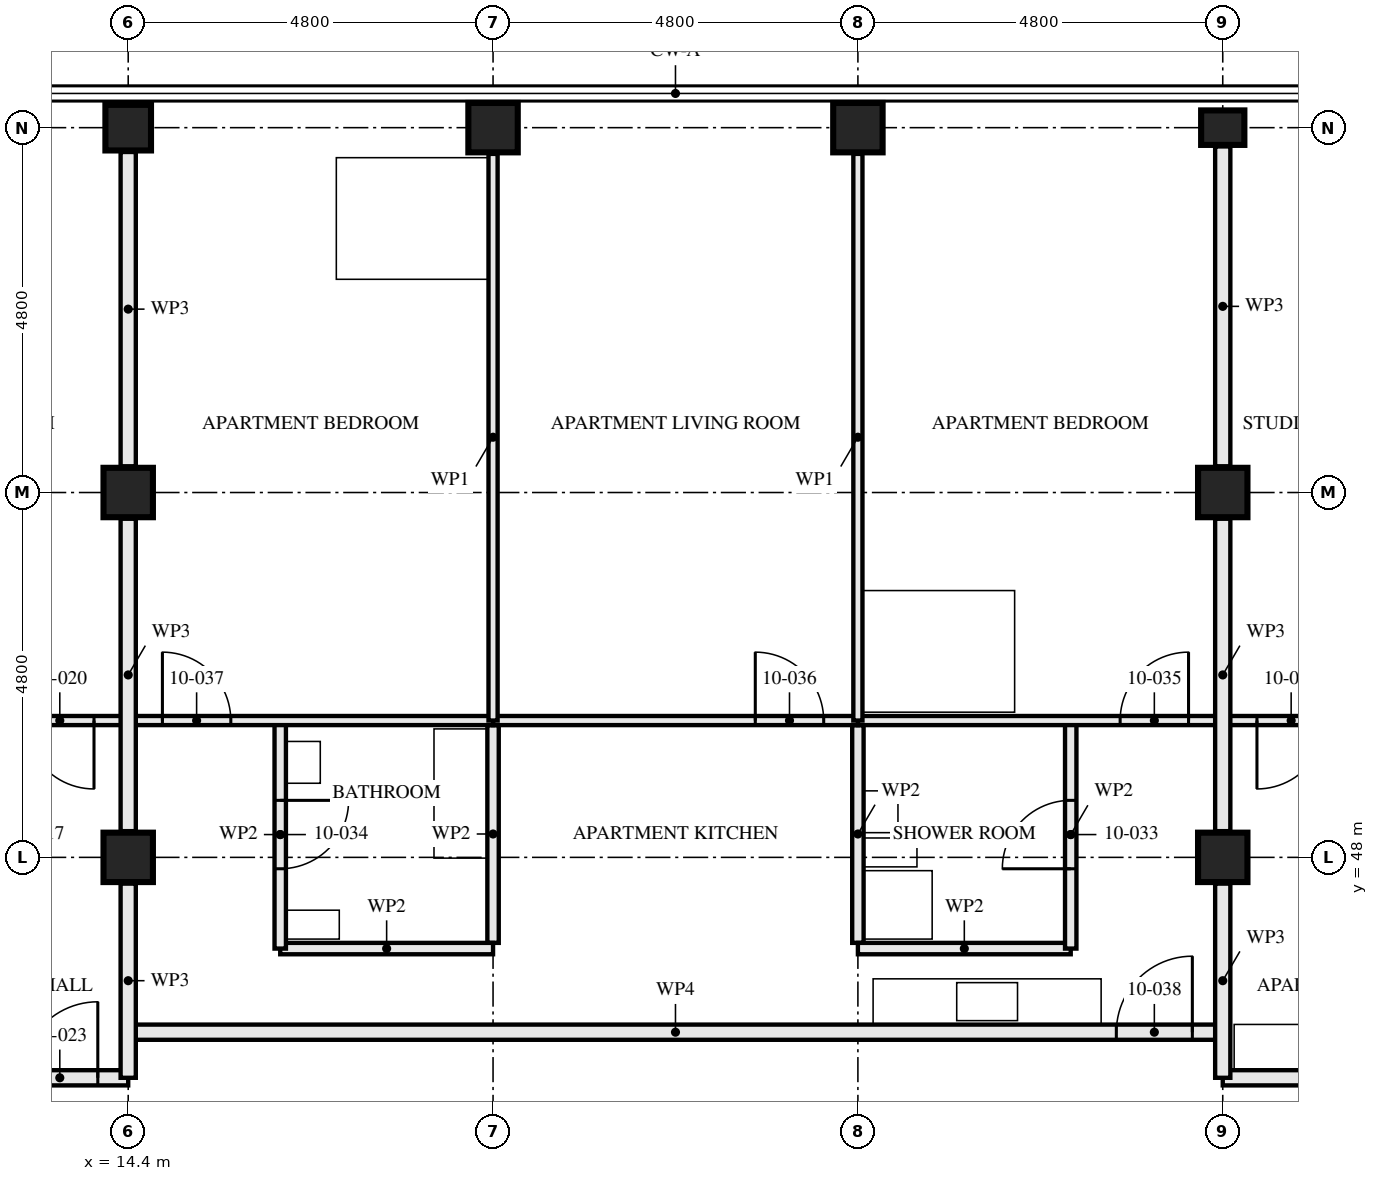
"""IFC4 building model, lengths in metres.
Left out: names, types, materials, properties, quantities, classifications, styles, units other than length and angle.
Written with IfcOpenShell. Run it as: python <this file> out.ifc"""

import sys

from ifc_helpers import new_model, si_unit, direction, frame, frame_2d, origin, origin_2d, place, context, subcontext, project, spatial, rectangle, hollow_rectangle, i_section, extrude, element, fill, save


model = new_model("IFC4")
c1 = context("Model", 3, precision=1e-05, world=origin(), true_north=direction((0.0, 1.0)))
c2 = subcontext(c1, "Body", "Model", "MODEL_VIEW")
j1 = project(units=[si_unit("LENGTHUNIT", "METRE"), si_unit("PLANEANGLEUNIT", "RADIAN")], contexts=[c1])
p1 = place(None, origin())
s1 = spatial("IfcSite", under=j1, at=p1, CompositionType="ELEMENT")
p2 = place(p1, origin())
s2 = spatial("IfcBuilding", under=s1, at=p2, CompositionType="ELEMENT")
p3 = place(p2, frame((0.0, 0.0, 41.0)))
s3 = spatial("IfcBuildingStorey", under=s2, at=p3, CompositionType="ELEMENT", Elevation=41.0)
for number, where, z_axis, x_axis in (
    (1, (14.4, 48.0, 0.0), (0.0, 0.0, 1.0), (1.0, 0.0, 0.0)),
    (2, (14.4, 52.8, 0.0), (0.0, 0.0, 1.0), (1.0, 0.0, 0.0)),
):
    element("IfcColumn", number, at=place(p3, frame(where, z_axis=z_axis, x_axis=x_axis)), inside=s3, PredefinedType="COLUMN", context=c2, shape_type="SweptSolid", body=[
        extrude(hollow_rectangle(XDim=0.65, YDim=0.65, WallThickness=0.05, at=origin_2d()), origin(), (0.0, 0.0, 1.0), 3.5),
    ])
p4 = place(p3, frame((14.4, 57.6, 0.0), z_axis=(0.0, 0.0, 1.0), x_axis=(0.0, 1.0, 0.0)))
e3 = element("IfcColumn", 3, at=p4, inside=s3, PredefinedType="COLUMN", context=c2, shape_type="SweptSolid", body=[
    extrude(hollow_rectangle(XDim=0.6, YDim=0.6, WallThickness=0.08, at=origin_2d()), origin(), (0.0, 0.0, 1.0), 3.5),
])
for number, where, z_axis, x_axis in (
    (4, (19.2, 57.6, 0.0), (0.0, 0.0, 1.0), (0.0, 1.0, 0.0)),
    (5, (24.0, 57.6, 0.0), (0.0, 0.0, 1.0), (0.0, 1.0, 0.0)),
):
    element("IfcColumn", number, at=place(p3, frame(where, z_axis=z_axis, x_axis=x_axis)), inside=s3, PredefinedType="COLUMN", context=c2, shape_type="SweptSolid", body=[
        extrude(hollow_rectangle(XDim=0.65, YDim=0.65, WallThickness=0.08, at=origin_2d()), origin(), (0.0, 0.0, 1.0), 3.5),
    ])
for number, where, z_axis, x_axis in (
    (6, (28.8, 48.0, 0.0), (0.0, 0.0, 1.0), (1.0, 0.0, 0.0)),
    (7, (28.8, 52.8, 0.0), (0.0, 0.0, 1.0), (1.0, 0.0, 0.0)),
):
    element("IfcColumn", number, at=place(p3, frame(where, z_axis=z_axis, x_axis=x_axis)), inside=s3, PredefinedType="COLUMN", context=c2, shape_type="SweptSolid", body=[
        extrude(hollow_rectangle(XDim=0.65, YDim=0.65, WallThickness=0.05, at=origin_2d()), origin(), (0.0, 0.0, 1.0), 3.5),
    ])
p5 = place(p3, frame((28.8, 57.6, 0.0), z_axis=(0.0, 0.0, 1.0), x_axis=(0.0, 1.0, 0.0)))
e8 = element("IfcColumn", 8, at=p5, inside=s3, PredefinedType="COLUMN", context=c2, shape_type="SweptSolid", body=[
    extrude(i_section(OverallWidth=0.454, OverallDepth=0.569, WebThickness=0.078, FlangeThickness=0.125, FilletRadius=0.015, at=origin_2d()), origin(), (0.0, 0.0, 1.0), 3.5),
])
p6 = place(p3, frame((14.4, 49.8, 0.0), z_axis=(0.0, 0.0, 1.0), x_axis=(-1.0, 0.0, 0.0)))
e9 = element("IfcWall", 9, at=p6, inside=s3, PredefinedType="PARTITIONING", context=c2, shape_type="SweptSolid", body=[
    extrude(rectangle(XDim=4.8, YDim=0.12, at=frame_2d((2.4, 0.0))), origin(), (0.0, 0.0, 1.0), 3.33),
])
p7 = place(p6, frame((0.45, 0.0, 0.0)))
e10 = element("IfcOpeningElement", 10, at=p7, cuts=e9, PredefinedType="OPENING", context=c2, shape_type="SweptSolid", body=[
    extrude(rectangle(XDim=0.9, YDim=2.1, at=frame_2d((0.45, 1.05))), frame((0.0, 0.071, 0.0), z_axis=(0.0, -1.0, 0.0), x_axis=(1.0, 0.0, 0.0)), (0.0, 0.0, 1.0), 0.141),
])
p8 = place(p3, frame((14.4, 45.1, 0.0), z_axis=(0.0, 0.0, 1.0), x_axis=(-1.0, 0.0, 0.0)))
e11 = element("IfcWall", 11, at=p8, inside=s3, PredefinedType="PARTITIONING", context=c2, shape_type="SweptSolid", body=[
    extrude(rectangle(XDim=9.6, YDim=0.2, at=frame_2d((4.8, 0.0))), origin(), (0.0, 0.0, 1.0), 3.33),
])
p9 = place(p8, frame((0.4, 0.0, 0.0)))
e12 = element("IfcOpeningElement", 12, at=p9, cuts=e11, PredefinedType="OPENING", context=c2, shape_type="SweptSolid", body=[
    extrude(rectangle(XDim=1.0, YDim=2.1, at=frame_2d((0.5, 1.05))), frame((0.0, 0.111, 0.0), z_axis=(0.0, -1.0, 0.0), x_axis=(1.0, 0.0, 0.0)), (0.0, 0.0, 1.0), 0.221),
])
p10 = place(p3, frame((26.8, 49.8, 0.0), z_axis=(0.0, 0.0, 1.0), x_axis=(0.0, -1.0, 0.0)))
e13 = element("IfcWall", 13, at=p10, inside=s3, PredefinedType="PARTITIONING", context=c2, shape_type="SweptSolid", body=[
    extrude(rectangle(XDim=3.0, YDim=0.15, at=frame_2d((1.5, 0.0))), origin(), (0.0, 0.0, 1.0), 2.55),
])
p11 = place(p10, frame((1.05, 0.0, 0.0)))
e14 = element("IfcOpeningElement", 14, at=p11, cuts=e13, PredefinedType="OPENING", context=c2, shape_type="SweptSolid", body=[
    extrude(rectangle(XDim=0.9, YDim=2.1, at=frame_2d((0.45, 1.05))), frame((0.0, 0.085, 0.0), z_axis=(0.0, -1.0, 0.0), x_axis=(1.0, 0.0, 0.0)), (0.0, 0.0, 1.0), 0.171),
])
p12 = place(p3, frame((26.8, 46.8, 0.0), z_axis=(0.0, 0.0, 1.0), x_axis=(-1.0, 0.0, 0.0)))
e15 = element("IfcWall", 15, at=p12, inside=s3, PredefinedType="PARTITIONING", context=c2, shape_type="SweptSolid", body=[
    extrude(rectangle(XDim=2.8, YDim=0.15, at=frame_2d((1.4, 0.0))), origin(), (0.0, 0.0, 1.0), 3.33),
])
p13 = place(p3, frame((16.4, 49.8, 0.0), z_axis=(0.0, 0.0, 1.0), x_axis=(0.0, -1.0, 0.0)))
e16 = element("IfcWall", 16, at=p13, inside=s3, PredefinedType="PARTITIONING", context=c2, shape_type="SweptSolid", body=[
    extrude(rectangle(XDim=3.0, YDim=0.15, at=frame_2d((1.5, 0.0))), origin(), (0.0, 0.0, 1.0), 2.55),
])
p14 = place(p13, frame((1.05, 0.0, 0.0)))
e17 = element("IfcOpeningElement", 17, at=p14, cuts=e16, PredefinedType="OPENING", context=c2, shape_type="SweptSolid", body=[
    extrude(rectangle(XDim=0.9, YDim=2.1, at=frame_2d((0.45, 1.05))), frame((0.0, 0.085, 0.0), z_axis=(0.0, -1.0, 0.0), x_axis=(1.0, 0.0, 0.0)), (0.0, 0.0, 1.0), 0.171),
])
p15 = place(p3, frame((19.2, 46.8, 0.0), z_axis=(0.0, 0.0, 1.0), x_axis=(-1.0, 0.0, 0.0)))
e18 = element("IfcWall", 18, at=p15, inside=s3, PredefinedType="PARTITIONING", context=c2, shape_type="SweptSolid", body=[
    extrude(rectangle(XDim=2.8, YDim=0.15, at=frame_2d((1.4, 0.0))), origin(), (0.0, 0.0, 1.0), 3.33),
])
p16 = place(p3, frame((28.8, 49.8, 0.0), z_axis=(0.0, 0.0, 1.0), x_axis=(-1.0, 0.0, 0.0)))
e19 = element("IfcWall", 19, at=p16, inside=s3, PredefinedType="PARTITIONING", context=c2, shape_type="SweptSolid", body=[
    extrude(rectangle(XDim=4.8, YDim=0.12, at=frame_2d((2.4, 0.0))), origin(), (0.0, 0.0, 1.0), 3.33),
])
p17 = place(p16, frame((0.45, 0.0, 0.0)))
e20 = element("IfcOpeningElement", 20, at=p17, cuts=e19, PredefinedType="OPENING", context=c2, shape_type="SweptSolid", body=[
    extrude(rectangle(XDim=0.9, YDim=2.1, at=frame_2d((0.45, 1.05))), frame((0.0, 0.071, 0.0), z_axis=(0.0, -1.0, 0.0), x_axis=(1.0, 0.0, 0.0)), (0.0, 0.0, 1.0), 0.141),
])
p18 = place(p3, frame((24.0, 49.8, 0.0), z_axis=(0.0, 0.0, 1.0), x_axis=(-1.0, 0.0, 0.0)))
e21 = element("IfcWall", 21, at=p18, inside=s3, PredefinedType="PARTITIONING", context=c2, shape_type="SweptSolid", body=[
    extrude(rectangle(XDim=4.8, YDim=0.12, at=frame_2d((2.4, 0.0))), origin(), (0.0, 0.0, 1.0), 3.33),
])
p19 = place(p18, frame((0.45, 0.0, 0.0)))
e22 = element("IfcOpeningElement", 22, at=p19, cuts=e21, PredefinedType="OPENING", context=c2, shape_type="SweptSolid", body=[
    extrude(rectangle(XDim=0.9, YDim=2.1, at=frame_2d((0.45, 1.05))), frame((0.0, 0.071, 0.0), z_axis=(0.0, -1.0, 0.0), x_axis=(1.0, 0.0, 0.0)), (0.0, 0.0, 1.0), 0.141),
])
p20 = place(p3, frame((19.2, 49.8, 0.0), z_axis=(0.0, 0.0, 1.0), x_axis=(-1.0, 0.0, 0.0)))
e23 = element("IfcWall", 23, at=p20, inside=s3, PredefinedType="PARTITIONING", context=c2, shape_type="SweptSolid", body=[
    extrude(rectangle(XDim=4.8, YDim=0.12, at=frame_2d((2.4, 0.0))), origin(), (0.0, 0.0, 1.0), 3.33),
])
p21 = place(p20, frame((3.45, 0.0, 0.0)))
e24 = element("IfcOpeningElement", 24, at=p21, cuts=e23, PredefinedType="OPENING", context=c2, shape_type="SweptSolid", body=[
    extrude(rectangle(XDim=0.9, YDim=2.1, at=frame_2d((0.45, 1.05))), frame((0.0, 0.071, 0.0), z_axis=(0.0, -1.0, 0.0), x_axis=(1.0, 0.0, 0.0)), (0.0, 0.0, 1.0), 0.141),
])
for number, where, z_axis, x_axis in (
    (25, (24.0, 57.255, 0.0), (0.0, 0.0, 1.0), (0.0, -1.0, 0.0)),
    (26, (19.2, 57.255, 0.0), (0.0, 0.0, 1.0), (0.0, -1.0, 0.0)),
):
    element("IfcWall", number, at=place(p3, frame(where, z_axis=z_axis, x_axis=x_axis)), inside=s3, PredefinedType="PARTITIONING", context=c2, shape_type="SweptSolid", body=[
        extrude(rectangle(XDim=7.455, YDim=0.12, at=frame_2d((3.728, 0.0))), origin(), (0.0, 0.0, 1.0), 2.55),
    ])
p22 = place(p3, frame((28.8, 45.7, 0.0), z_axis=(0.0, 0.0, 1.0), x_axis=(-1.0, 0.0, 0.0)))
e27 = element("IfcWall", 27, at=p22, inside=s3, PredefinedType="PARTITIONING", context=c2, shape_type="SweptSolid", body=[
    extrude(rectangle(XDim=14.4, YDim=0.2, at=frame_2d((7.2, 0.0))), origin(), (0.0, 0.0, 1.0), 3.33),
])
p23 = place(p22, frame((0.4, 0.0, 0.0)))
e28 = element("IfcOpeningElement", 28, at=p23, cuts=e27, PredefinedType="OPENING", context=c2, shape_type="SweptSolid", body=[
    extrude(rectangle(XDim=1.0, YDim=2.1, at=frame_2d((0.5, 1.05))), frame((0.0, 0.111, 0.0), z_axis=(0.0, -1.0, 0.0), x_axis=(1.0, 0.0, 0.0)), (0.0, 0.0, 1.0), 0.221),
])
p24 = place(p3, frame((33.6, 49.8, 0.0), z_axis=(0.0, 0.0, 1.0), x_axis=(-1.0, 0.0, 0.0)))
e29 = element("IfcWall", 29, at=p24, inside=s3, PredefinedType="PARTITIONING", context=c2, shape_type="SweptSolid", body=[
    extrude(rectangle(XDim=4.8, YDim=0.12, at=frame_2d((2.4, 0.0))), origin(), (0.0, 0.0, 1.0), 3.33),
])
p25 = place(p24, frame((3.45, 0.0, 0.0)))
e30 = element("IfcOpeningElement", 30, at=p25, cuts=e29, PredefinedType="OPENING", context=c2, shape_type="SweptSolid", body=[
    extrude(rectangle(XDim=0.9, YDim=2.1, at=frame_2d((0.45, 1.05))), frame((0.0, 0.071, 0.0), z_axis=(0.0, -1.0, 0.0), x_axis=(1.0, 0.0, 0.0)), (0.0, 0.0, 1.0), 0.141),
])
p26 = place(p3, frame((38.4, 45.1, 0.0), z_axis=(0.0, 0.0, 1.0), x_axis=(-1.0, 0.0, 0.0)))
e31 = element("IfcWall", 31, at=p26, inside=s3, PredefinedType="PARTITIONING", context=c2, shape_type="SweptSolid", body=[
    extrude(rectangle(XDim=9.6, YDim=0.2, at=frame_2d((4.8, 0.0))), origin(), (0.0, 0.0, 1.0), 3.33),
])
p27 = place(p26, frame((0.4, 0.0, 0.0)))
e32 = element("IfcOpeningElement", 32, at=p27, cuts=e31, PredefinedType="OPENING", context=c2, shape_type="SweptSolid", body=[
    extrude(rectangle(XDim=1.0, YDim=2.1, at=frame_2d((0.5, 1.05))), frame((0.0, 0.111, 0.0), z_axis=(0.0, -1.0, 0.0), x_axis=(1.0, 0.0, 0.0)), (0.0, 0.0, 1.0), 0.221),
])
p28 = place(p26, frame((5.2, 0.0, 0.0)))
e33 = element("IfcOpeningElement", 33, at=p28, cuts=e31, PredefinedType="OPENING", context=c2, shape_type="SweptSolid", body=[
    extrude(rectangle(XDim=1.0, YDim=2.1, at=frame_2d((0.5, 1.05))), frame((0.0, 0.111, 0.0), z_axis=(0.0, -1.0, 0.0), x_axis=(1.0, 0.0, 0.0)), (0.0, 0.0, 1.0), 0.221),
])
p29 = place(p3, frame((14.4, 45.1, 0.0), z_axis=(0.0, 0.0, 1.0), x_axis=(0.0, 1.0, 0.0)))
e34 = element("IfcWall", 34, at=p29, inside=s3, PredefinedType="PARTITIONING", context=c2, shape_type="SweptSolid", body=[
    extrude(rectangle(XDim=2.555, YDim=0.2, at=frame_2d((1.277, 0.0))), origin(), (0.0, 0.0, 1.0), 2.32),
])
p30 = place(p3, frame((14.4, 48.345, 0.0), z_axis=(0.0, 0.0, 1.0), x_axis=(0.0, 1.0, 0.0)))
e35 = element("IfcWall", 35, at=p30, inside=s3, PredefinedType="PARTITIONING", context=c2, shape_type="SweptSolid", body=[
    extrude(rectangle(XDim=4.11, YDim=0.2, at=frame_2d((2.055, 0.0))), origin(), (0.0, 0.0, 1.0), 2.32),
])
p31 = place(p3, frame((14.4, 53.145, 0.0), z_axis=(0.0, 0.0, 1.0), x_axis=(0.0, 1.0, 0.0)))
e36 = element("IfcWall", 36, at=p31, inside=s3, PredefinedType="PARTITIONING", context=c2, shape_type="SweptSolid", body=[
    extrude(rectangle(XDim=4.135, YDim=0.2, at=frame_2d((2.067, 0.0))), origin(), (0.0, 0.0, 1.0), 2.32),
])
p32 = place(p3, frame((28.8, 45.1, 0.0), z_axis=(0.0, 0.0, 1.0), x_axis=(0.0, 1.0, 0.0)))
e37 = element("IfcWall", 37, at=p32, inside=s3, PredefinedType="PARTITIONING", context=c2, shape_type="SweptSolid", body=[
    extrude(rectangle(XDim=2.555, YDim=0.2, at=frame_2d((1.277, 0.0))), origin(), (0.0, 0.0, 1.0), 2.32),
])
p33 = place(p3, frame((28.8, 48.345, 0.0), z_axis=(0.0, 0.0, 1.0), x_axis=(0.0, 1.0, 0.0)))
e38 = element("IfcWall", 38, at=p33, inside=s3, PredefinedType="PARTITIONING", context=c2, shape_type="SweptSolid", body=[
    extrude(rectangle(XDim=4.11, YDim=0.2, at=frame_2d((2.055, 0.0))), origin(), (0.0, 0.0, 1.0), 2.32),
])
p34 = place(p3, frame((28.8, 53.145, 0.0), z_axis=(0.0, 0.0, 1.0), x_axis=(0.0, 1.0, 0.0)))
e39 = element("IfcWall", 39, at=p34, inside=s3, PredefinedType="PARTITIONING", context=c2, shape_type="SweptSolid", body=[
    extrude(rectangle(XDim=4.208, YDim=0.2, at=frame_2d((2.104, 0.0))), origin(), (0.0, 0.0, 1.0), 2.32),
])
for number, where, z_axis, x_axis in (
    (40, (24.0, 46.875, 0.0), (0.0, 0.0, 1.0), (0.0, 1.0, 0.0)),
    (41, (19.2, 49.74, 0.0), (0.0, 0.0, 1.0), (0.0, -1.0, 0.0)),
):
    element("IfcWall", number, at=place(p3, frame(where, z_axis=z_axis, x_axis=x_axis)), inside=s3, PredefinedType="PARTITIONING", context=c2, shape_type="SweptSolid", body=[
        extrude(rectangle(XDim=2.865, YDim=0.15, at=frame_2d((1.433, 0.0))), origin(), (0.0, 0.0, 1.0), 2.55),
    ])
p35 = place(p7, origin())
e42 = element("IfcDoor", 42, at=p35, inside=s3, OperationType="SINGLE_SWING_RIGHT", PredefinedType="DOOR", context=c2, shape_type="SweptSolid", body=[
    extrude(rectangle(XDim=0.9, YDim=2.1, at=frame_2d((0.45, 1.05))), frame((0.0, 0.022, 0.0), z_axis=(0.0, -1.0, 0.0), x_axis=(1.0, 0.0, 0.0)), (0.0, 0.0, 1.0), 0.044),
])
fill(e10, e42)
p36 = place(p9, frame((1.0, 0.0, 0.0), z_axis=(0.0, 0.0, 1.0), x_axis=(-1.0, 0.0, 0.0)))
e43 = element("IfcDoor", 43, at=p36, inside=s3, OperationType="SINGLE_SWING_LEFT", PredefinedType="DOOR", context=c2, shape_type="SweptSolid", body=[
    extrude(rectangle(XDim=1.0, YDim=2.1, at=frame_2d((0.5, 1.05))), frame((0.0, 0.027, 0.0), z_axis=(0.0, -1.0, 0.0), x_axis=(1.0, 0.0, 0.0)), (0.0, 0.0, 1.0), 0.054),
])
fill(e12, e43)
p37 = place(p11, frame((0.9, 0.0, 0.0), z_axis=(0.0, 0.0, 1.0), x_axis=(-1.0, 0.0, 0.0)))
e44 = element("IfcDoor", 44, at=p37, inside=s3, OperationType="SINGLE_SWING_RIGHT", PredefinedType="DOOR", context=c2, shape_type="SweptSolid", body=[
    extrude(rectangle(XDim=0.9, YDim=2.1, at=frame_2d((0.45, 1.05))), frame((0.0, 0.022, 0.0), z_axis=(0.0, -1.0, 0.0), x_axis=(1.0, 0.0, 0.0)), (0.0, 0.0, 1.0), 0.044),
])
fill(e14, e44)
p38 = place(p14, origin())
e45 = element("IfcDoor", 45, at=p38, inside=s3, OperationType="SINGLE_SWING_RIGHT", PredefinedType="DOOR", context=c2, shape_type="SweptSolid", body=[
    extrude(rectangle(XDim=0.9, YDim=2.1, at=frame_2d((0.45, 1.05))), frame((0.0, 0.022, 0.0), z_axis=(0.0, -1.0, 0.0), x_axis=(1.0, 0.0, 0.0)), (0.0, 0.0, 1.0), 0.044),
])
fill(e17, e45)
p39 = place(p17, frame((0.9, 0.0, 0.0), z_axis=(0.0, 0.0, 1.0), x_axis=(-1.0, 0.0, 0.0)))
e46 = element("IfcDoor", 46, at=p39, inside=s3, OperationType="SINGLE_SWING_LEFT", PredefinedType="DOOR", context=c2, shape_type="SweptSolid", body=[
    extrude(rectangle(XDim=0.9, YDim=2.1, at=frame_2d((0.45, 1.05))), frame((0.0, 0.022, 0.0), z_axis=(0.0, -1.0, 0.0), x_axis=(1.0, 0.0, 0.0)), (0.0, 0.0, 1.0), 0.044),
])
fill(e20, e46)
p40 = place(p19, frame((0.9, 0.0, 0.0), z_axis=(0.0, 0.0, 1.0), x_axis=(-1.0, 0.0, 0.0)))
e47 = element("IfcDoor", 47, at=p40, inside=s3, OperationType="SINGLE_SWING_RIGHT", PredefinedType="DOOR", context=c2, shape_type="SweptSolid", body=[
    extrude(rectangle(XDim=0.9, YDim=2.1, at=frame_2d((0.45, 1.05))), frame((0.0, 0.022, 0.0), z_axis=(0.0, -1.0, 0.0), x_axis=(1.0, 0.0, 0.0)), (0.0, 0.0, 1.0), 0.044),
])
fill(e22, e47)
p41 = place(p21, frame((0.9, 0.0, 0.0), z_axis=(0.0, 0.0, 1.0), x_axis=(-1.0, 0.0, 0.0)))
e48 = element("IfcDoor", 48, at=p41, inside=s3, OperationType="SINGLE_SWING_RIGHT", PredefinedType="DOOR", context=c2, shape_type="SweptSolid", body=[
    extrude(rectangle(XDim=0.9, YDim=2.1, at=frame_2d((0.45, 1.05))), frame((0.0, 0.022, 0.0), z_axis=(0.0, -1.0, 0.0), x_axis=(1.0, 0.0, 0.0)), (0.0, 0.0, 1.0), 0.044),
])
fill(e24, e48)
p42 = place(p23, frame((1.0, 0.0, 0.0), z_axis=(0.0, 0.0, 1.0), x_axis=(-1.0, 0.0, 0.0)))
e49 = element("IfcDoor", 49, at=p42, inside=s3, OperationType="SINGLE_SWING_LEFT", PredefinedType="DOOR", context=c2, shape_type="SweptSolid", body=[
    extrude(rectangle(XDim=1.0, YDim=2.1, at=frame_2d((0.5, 1.05))), frame((0.0, 0.027, 0.0), z_axis=(0.0, -1.0, 0.0), x_axis=(1.0, 0.0, 0.0)), (0.0, 0.0, 1.0), 0.054),
])
fill(e28, e49)
p43 = place(p25, origin())
e50 = element("IfcDoor", 50, at=p43, inside=s3, OperationType="SINGLE_SWING_LEFT", PredefinedType="DOOR", context=c2, shape_type="SweptSolid", body=[
    extrude(rectangle(XDim=0.9, YDim=2.1, at=frame_2d((0.45, 1.05))), frame((0.0, 0.022, 0.0), z_axis=(0.0, -1.0, 0.0), x_axis=(1.0, 0.0, 0.0)), (0.0, 0.0, 1.0), 0.044),
])
fill(e30, e50)
save(model, sys.argv[1])
